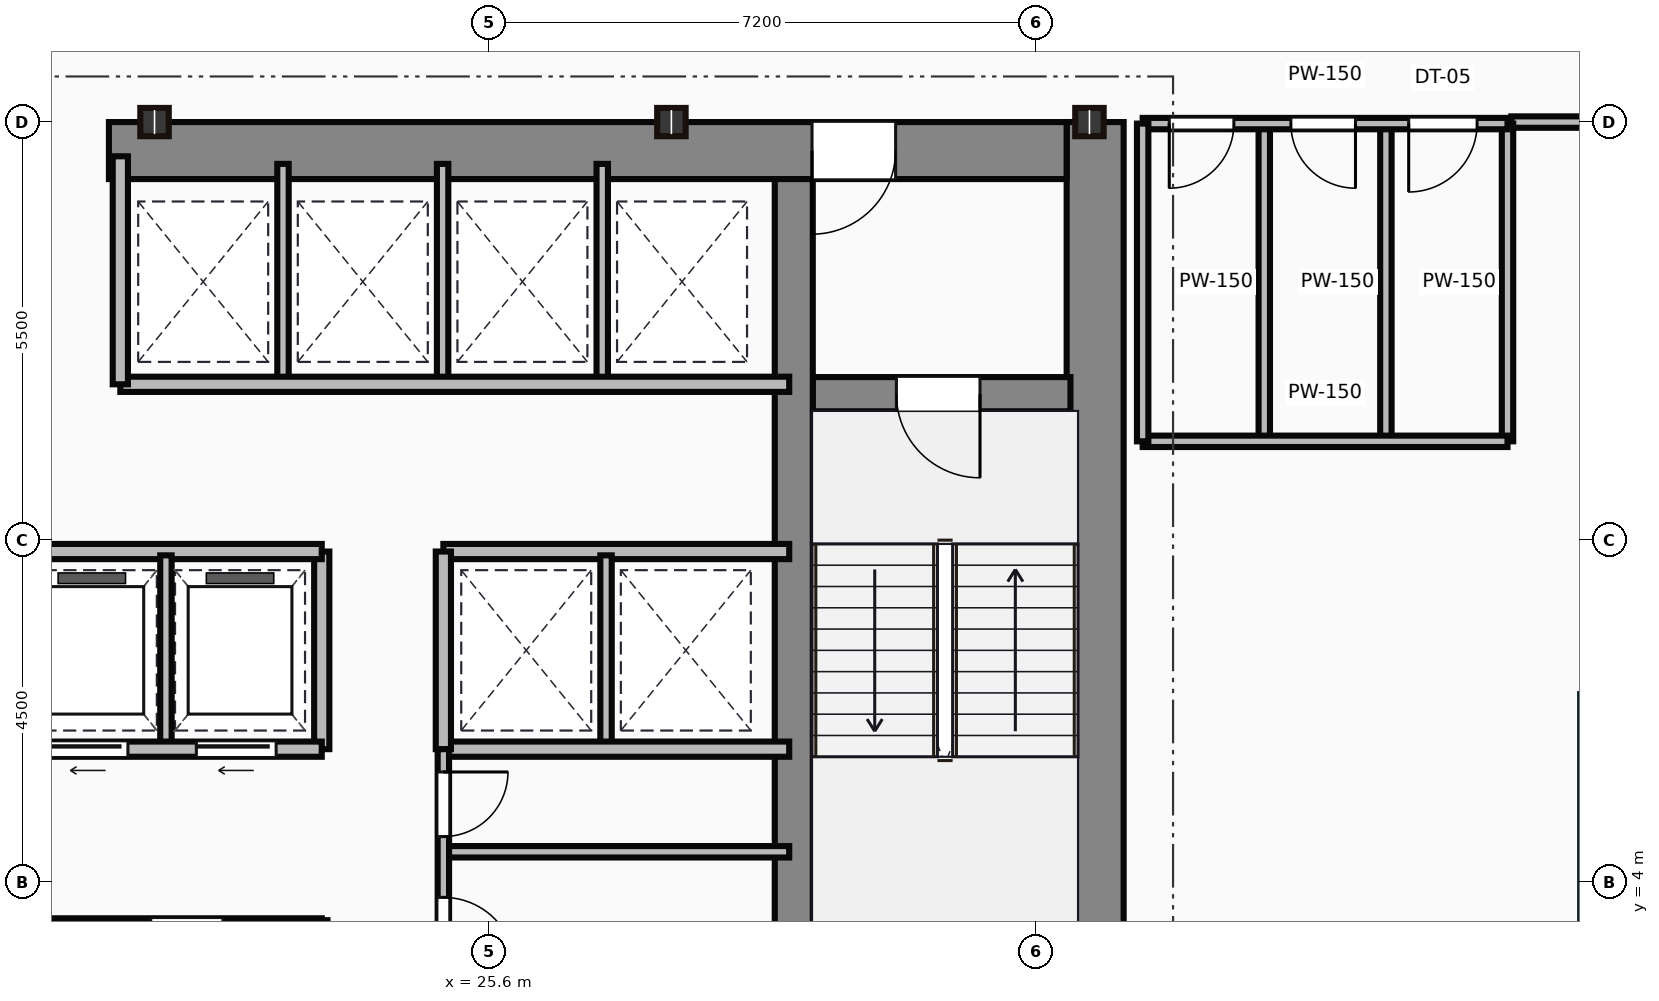
"""IFC4 building model, lengths in metres.
Left out: names, types, materials, properties, quantities, classifications, styles, units other than length and angle.
Written with IfcOpenShell. Run it as: python <this file> out.ifc"""

import sys

from ifc_helpers import new_model, si_unit, direction, frame, frame_2d, origin, origin_2d, place, context, subcontext, project, spatial, rectangle, i_section, extrude, source, transform, mapped, element, fill, save


model = new_model("IFC4")
c1 = context("Model", 3, precision=1e-05, world=origin(), true_north=direction((0.0, 1.0)))
c2 = subcontext(c1, "Body", "Model", "MODEL_VIEW")
j1 = project(units=[si_unit("LENGTHUNIT", "METRE"), si_unit("PLANEANGLEUNIT", "RADIAN")], contexts=[c1])
p1 = place(None, origin())
s1 = spatial("IfcSite", under=j1, at=p1, CompositionType="ELEMENT")
p2 = place(p1, origin())
s2 = spatial("IfcBuilding", under=s1, at=p2, CompositionType="ELEMENT")
p3 = place(p2, frame((0.0, 0.0, 169.8)))
s3 = spatial("IfcBuildingStorey", under=s2, at=p3, CompositionType="ELEMENT", Elevation=169.8)
m1 = source(origin(), c2, "Body", "SweptSolid", [
    extrude(rectangle(XDim=13.1, YDim=0.75, at=frame_2d((6.55, 0.0))), origin(), (0.0, 0.0, 1.0), 3.65),
])
p4 = place(p3, frame((33.575, 0.9, 0.0), z_axis=(0.0, 0.0, 1.0), x_axis=(0.0, 1.0, 0.0)))
e1 = element("IfcWall", 1, at=p4, inside=s3, PredefinedType="SHEAR", context=c2, shape_type="MappedRepresentation", body=[
    mapped(m1, transform((0.0, 0.0, 0.0))),
])
m2 = source(origin(), c2, "Body", "SweptSolid", [
    extrude(rectangle(XDim=12.6, YDim=0.75, at=frame_2d((6.3, 0.0))), origin(), (0.0, 0.0, 1.0), 3.65),
])
p5 = place(p3, frame((20.6, 13.625, 0.0), z_axis=(0.0, 0.0, 1.0), x_axis=(1.0, 0.0, 0.0)))
e2 = element("IfcWall", 2, at=p5, inside=s3, PredefinedType="SHEAR", context=c2, shape_type="MappedRepresentation", body=[
    mapped(m2, transform((0.0, 0.0, 0.0))),
])
p6 = place(p5, frame((9.25, 0.0, 0.0)))
e3 = element("IfcOpeningElement", 3, at=p6, cuts=e2, PredefinedType="OPENING", context=c2, shape_type="SweptSolid", body=[
    extrude(rectangle(XDim=1.1, YDim=2.15, at=frame_2d((0.55, 1.075))), frame((0.0, 0.385, 0.0), z_axis=(0.0, -1.0, 0.0), x_axis=(1.0, 0.0, 0.0)), (0.0, 0.0, 1.0), 0.77),
])
m3 = source(origin(), c2, "Body", "SweptSolid", [
    extrude(rectangle(XDim=12.35, YDim=0.5, at=frame_2d((6.175, 0.0))), origin(), (0.0, 0.0, 1.0), 3.65),
])
p7 = place(p3, frame((29.61, 0.9, 0.0), z_axis=(0.0, 0.0, 1.0), x_axis=(0.0, 1.0, 0.0)))
e4 = element("IfcWall", 4, at=p7, inside=s3, PredefinedType="SHEAR", context=c2, shape_type="MappedRepresentation", body=[
    mapped(m3, transform((0.0, 0.0, 0.0))),
])
m4 = source(origin(), c2, "Body", "SweptSolid", [
    extrude(rectangle(XDim=3.39, YDim=0.45, at=frame_2d((1.695, 0.0))), origin(), (0.0, 0.0, 1.0), 3.65),
])
p8 = place(p3, frame((29.86, 10.42, 0.0), z_axis=(0.0, 0.0, 1.0), x_axis=(1.0, 0.0, 0.0)))
e5 = element("IfcWall", 5, at=p8, inside=s3, PredefinedType="SHEAR", context=c2, shape_type="MappedRepresentation", body=[
    mapped(m4, transform((0.0, 0.0, 0.0))),
])
p9 = place(p8, frame((1.1, 0.0, 0.0)))
e6 = element("IfcOpeningElement", 6, at=p9, cuts=e5, PredefinedType="OPENING", context=c2, shape_type="SweptSolid", body=[
    extrude(rectangle(XDim=1.1, YDim=2.15, at=frame_2d((0.55, 1.075))), frame((0.0, 0.235, 0.0), z_axis=(0.0, -1.0, 0.0), x_axis=(1.0, 0.0, 0.0)), (0.0, 0.0, 1.0), 0.47),
])
m5 = source(origin(), c2, "Body", "SweptSolid", [
    extrude(i_section(OverallWidth=0.374, OverallDepth=0.372, WebThickness=0.016, FlangeThickness=0.026, at=origin_2d()), origin(), (0.0, 0.0, 1.0), 3.65),
])
for number, where, z_axis, x_axis in (
    (7, (21.2, 14.0, 0.0), (0.0, 0.0, 1.0), (1.0, 0.0, 0.0)),
    (8, (28.0, 14.0, 0.0), (0.0, 0.0, 1.0), (1.0, 0.0, 0.0)),
    (9, (33.5, 14.0, 0.0), (0.0, 0.0, 1.0), (1.0, 0.0, 0.0)),
):
    element("IfcColumn", number, at=place(p3, frame(where, z_axis=z_axis, x_axis=x_axis)), inside=s3, PredefinedType="COLUMN", context=c2, shape_type="MappedRepresentation", body=[
        mapped(m5, transform((0.0, 0.0, 0.0))),
    ])
m6 = source(origin(), c2, "Body", "SweptSolid", [
    extrude(rectangle(XDim=10.35, YDim=0.15, at=frame_2d((5.175, 0.0))), origin(), (0.0, 0.0, 1.0), 3.4),
])
p10 = place(p3, frame((13.05, 3.45, 0.0), z_axis=(0.0, 0.0, 1.0), x_axis=(1.0, 0.0, 0.0)))
e10 = element("IfcWall", 10, at=p10, inside=s3, PredefinedType="PARTITIONING", context=c2, shape_type="MappedRepresentation", body=[
    mapped(m6, transform((0.0, 0.0, 0.0))),
])
p11 = place(p10, frame((3.8, 0.0, 0.0)))
e11 = element("IfcOpeningElement", 11, at=p11, cuts=e10, PredefinedType="OPENING", context=c2, shape_type="SweptSolid", body=[
    extrude(rectangle(XDim=0.95, YDim=2.15, at=frame_2d((0.475, 1.075))), frame((0.0, 0.085, 0.0), z_axis=(0.0, -1.0, 0.0), x_axis=(1.0, 0.0, 0.0)), (0.0, 0.0, 1.0), 0.17),
])
p12 = place(p10, frame((8.1, 0.0, 0.0)))
e12 = element("IfcOpeningElement", 12, at=p12, cuts=e10, PredefinedType="OPENING", context=c2, shape_type="SweptSolid", body=[
    extrude(rectangle(XDim=0.95, YDim=2.15, at=frame_2d((0.475, 1.075))), frame((0.0, 0.085, 0.0), z_axis=(0.0, -1.0, 0.0), x_axis=(1.0, 0.0, 0.0)), (0.0, 0.0, 1.0), 0.17),
])
m7 = source(origin(), c2, "Body", "SweptSolid", [
    extrude(rectangle(XDim=2.65, YDim=0.15, at=frame_2d((1.325, 0.0))), origin(), (0.0, 0.0, 1.0), 3.4),
])
p13 = place(p3, frame((23.4, 0.85, 0.0), z_axis=(0.0, 0.0, 1.0), x_axis=(0.0, 1.0, 0.0)))
e13 = element("IfcWall", 13, at=p13, inside=s3, PredefinedType="PARTITIONING", context=c2, shape_type="MappedRepresentation", body=[
    mapped(m7, transform((0.0, 0.0, 0.0))),
])
m8 = source(origin(), c2, "Body", "SweptSolid", [
    extrude(rectangle(XDim=11.85, YDim=0.2, at=frame_2d((5.925, 0.0))), origin(), (0.0, 0.0, 1.0), 3.4),
])
p14 = place(p3, frame((11.55, 5.75, 0.0), z_axis=(0.0, 0.0, 1.0), x_axis=(1.0, 0.0, 0.0)))
e14 = element("IfcWall", 14, at=p14, inside=s3, PredefinedType="PARTITIONING", context=c2, shape_type="MappedRepresentation", body=[
    mapped(m8, transform((0.0, 0.0, 0.0))),
])
p15 = place(p14, frame((0.45, 0.0, 0.0)))
e15 = element("IfcOpeningElement", 15, at=p15, cuts=e14, PredefinedType="OPENING", context=c2, shape_type="SweptSolid", body=[
    extrude(rectangle(XDim=1.05, YDim=2.15, at=frame_2d((0.525, 1.075))), frame((0.0, 0.11, 0.0), z_axis=(0.0, -1.0, 0.0), x_axis=(1.0, 0.0, 0.0)), (0.0, 0.0, 1.0), 0.22),
])
p16 = place(p14, frame((2.4, 0.0, 0.0)))
e16 = element("IfcOpeningElement", 16, at=p16, cuts=e14, PredefinedType="OPENING", context=c2, shape_type="SweptSolid", body=[
    extrude(rectangle(XDim=1.05, YDim=2.15, at=frame_2d((0.525, 1.075))), frame((0.0, 0.11, 0.0), z_axis=(0.0, -1.0, 0.0), x_axis=(1.0, 0.0, 0.0)), (0.0, 0.0, 1.0), 0.22),
])
p17 = place(p14, frame((4.35, 0.0, 0.0)))
e17 = element("IfcOpeningElement", 17, at=p17, cuts=e14, PredefinedType="OPENING", context=c2, shape_type="SweptSolid", body=[
    extrude(rectangle(XDim=1.05, YDim=2.15, at=frame_2d((0.525, 1.075))), frame((0.0, 0.11, 0.0), z_axis=(0.0, -1.0, 0.0), x_axis=(1.0, 0.0, 0.0)), (0.0, 0.0, 1.0), 0.22),
])
p18 = place(p14, frame((6.3, 0.0, 0.0)))
e18 = element("IfcOpeningElement", 18, at=p18, cuts=e14, PredefinedType="OPENING", context=c2, shape_type="SweptSolid", body=[
    extrude(rectangle(XDim=1.05, YDim=2.15, at=frame_2d((0.525, 1.075))), frame((0.0, 0.11, 0.0), z_axis=(0.0, -1.0, 0.0), x_axis=(1.0, 0.0, 0.0)), (0.0, 0.0, 1.0), 0.22),
])
p19 = place(p14, frame((8.25, 0.0, 0.0)))
e19 = element("IfcOpeningElement", 19, at=p19, cuts=e14, PredefinedType="OPENING", context=c2, shape_type="SweptSolid", body=[
    extrude(rectangle(XDim=1.05, YDim=2.15, at=frame_2d((0.525, 1.075))), frame((0.0, 0.11, 0.0), z_axis=(0.0, -1.0, 0.0), x_axis=(1.0, 0.0, 0.0)), (0.0, 0.0, 1.0), 0.22),
])
p20 = place(p14, frame((10.2, 0.0, 0.0)))
e20 = element("IfcOpeningElement", 20, at=p20, cuts=e14, PredefinedType="OPENING", context=c2, shape_type="SweptSolid", body=[
    extrude(rectangle(XDim=1.05, YDim=2.15, at=frame_2d((0.525, 1.075))), frame((0.0, 0.11, 0.0), z_axis=(0.0, -1.0, 0.0), x_axis=(1.0, 0.0, 0.0)), (0.0, 0.0, 1.0), 0.22),
])
p21 = place(p3, frame((11.55, 8.35, 0.0), z_axis=(0.0, 0.0, 1.0), x_axis=(1.0, 0.0, 0.0)))
e21 = element("IfcWall", 21, at=p21, inside=s3, PredefinedType="PARTITIONING", context=c2, shape_type="MappedRepresentation", body=[
    mapped(m8, transform((0.0, 0.0, 0.0))),
])
m9 = source(origin(), c2, "Body", "SweptSolid", [
    extrude(rectangle(XDim=2.6, YDim=0.2, at=frame_2d((1.3, 0.0))), origin(), (0.0, 0.0, 1.0), 3.4),
])
p22 = place(p3, frame((23.4, 5.75, 0.0), z_axis=(0.0, 0.0, 1.0), x_axis=(0.0, 1.0, 0.0)))
e22 = element("IfcWall", 22, at=p22, inside=s3, PredefinedType="PARTITIONING", context=c2, shape_type="MappedRepresentation", body=[
    mapped(m9, transform((0.0, 0.0, 0.0))),
])
m10 = source(origin(), c2, "Body", "SweptSolid", [
    extrude(rectangle(XDim=2.5, YDim=0.15, at=frame_2d((1.25, 0.0))), origin(), (0.0, 0.0, 1.0), 3.4),
])
p23 = place(p3, frame((21.35, 5.8, 0.0), z_axis=(0.0, 0.0, 1.0), x_axis=(0.0, 1.0, 0.0)))
e23 = element("IfcWall", 23, at=p23, inside=s3, PredefinedType="PARTITIONING", context=c2, shape_type="MappedRepresentation", body=[
    mapped(m10, transform((0.0, 0.0, 0.0))),
])
m11 = source(origin(), c2, "Body", "SweptSolid", [
    extrude(rectangle(XDim=8.8, YDim=0.2, at=frame_2d((4.4, 0.0))), origin(), (0.0, 0.0, 1.0), 3.4),
])
p24 = place(p3, frame((20.75, 10.55, 0.0), z_axis=(0.0, 0.0, 1.0), x_axis=(1.0, 0.0, 0.0)))
e24 = element("IfcWall", 24, at=p24, inside=s3, PredefinedType="PARTITIONING", context=c2, shape_type="MappedRepresentation", body=[
    mapped(m11, transform((0.0, 0.0, 0.0))),
])
m12 = source(origin(), c2, "Body", "SweptSolid", [
    extrude(rectangle(XDim=3.0, YDim=0.2, at=frame_2d((1.5, 0.0))), origin(), (0.0, 0.0, 1.0), 3.4),
])
p25 = place(p3, frame((20.75, 10.55, 0.0), z_axis=(0.0, 0.0, 1.0), x_axis=(0.0, 1.0, 0.0)))
e25 = element("IfcWall", 25, at=p25, inside=s3, PredefinedType="PARTITIONING", context=c2, shape_type="MappedRepresentation", body=[
    mapped(m12, transform((0.0, 0.0, 0.0))),
])
m13 = source(origin(), c2, "Body", "SweptSolid", [
    extrude(rectangle(XDim=2.85, YDim=0.15, at=frame_2d((1.425, 0.0))), origin(), (0.0, 0.0, 1.0), 3.4),
])
for number, where, z_axis, x_axis in (
    (26, (22.89, 10.6, 0.0), (0.0, 0.0, 1.0), (0.0, 1.0, 0.0)),
    (27, (24.99, 10.6, 0.0), (0.0, 0.0, 1.0), (0.0, 1.0, 0.0)),
    (28, (27.09, 10.6, 0.0), (0.0, 0.0, 1.0), (0.0, 1.0, 0.0)),
):
    element("IfcWall", number, at=place(p3, frame(where, z_axis=z_axis, x_axis=x_axis)), inside=s3, PredefinedType="PARTITIONING", context=c2, shape_type="MappedRepresentation", body=[
        mapped(m13, transform((0.0, 0.0, 0.0))),
    ])
m14 = source(origin(), c2, "Body", "SweptSolid", [
    extrude(rectangle(XDim=4.55, YDim=0.2, at=frame_2d((2.275, 0.0))), origin(), (0.0, 0.0, 1.0), 3.4),
])
for number, where, z_axis, x_axis in (
    (29, (25.0, 8.35, 0.0), (0.0, 0.0, 1.0), (1.0, 0.0, 0.0)),
    (30, (25.0, 5.75, 0.0), (0.0, 0.0, 1.0), (1.0, 0.0, 0.0)),
):
    element("IfcWall", number, at=place(p3, frame(where, z_axis=z_axis, x_axis=x_axis)), inside=s3, PredefinedType="PARTITIONING", context=c2, shape_type="MappedRepresentation", body=[
        mapped(m14, transform((0.0, 0.0, 0.0))),
    ])
p26 = place(p3, frame((25.0, 5.75, 0.0), z_axis=(0.0, 0.0, 1.0), x_axis=(0.0, 1.0, 0.0)))
e31 = element("IfcWall", 31, at=p26, inside=s3, PredefinedType="PARTITIONING", context=c2, shape_type="MappedRepresentation", body=[
    mapped(m9, transform((0.0, 0.0, 0.0))),
])
p27 = place(p3, frame((27.14, 5.8, 0.0), z_axis=(0.0, 0.0, 1.0), x_axis=(0.0, 1.0, 0.0)))
e32 = element("IfcWall", 32, at=p27, inside=s3, PredefinedType="PARTITIONING", context=c2, shape_type="MappedRepresentation", body=[
    mapped(m10, transform((0.0, 0.0, 0.0))),
])
m15 = source(origin(), c2, "Body", "SweptSolid", [
    extrude(rectangle(XDim=4.9, YDim=0.15, at=frame_2d((2.45, 0.0))), origin(), (0.0, 0.0, 1.0), 3.4),
])
p28 = place(p3, frame((25.0, 0.85, 0.0), z_axis=(0.0, 0.0, 1.0), x_axis=(0.0, 1.0, 0.0)))
e33 = element("IfcWall", 33, at=p28, inside=s3, PredefinedType="PARTITIONING", context=c2, shape_type="MappedRepresentation", body=[
    mapped(m15, transform((0.0, 0.0, 0.0))),
])
p29 = place(p28, frame((2.0, 0.0, 0.0)))
e34 = element("IfcOpeningElement", 34, at=p29, cuts=e33, PredefinedType="OPENING", context=c2, shape_type="SweptSolid", body=[
    extrude(rectangle(XDim=0.95, YDim=2.15, at=frame_2d((0.475, 1.075))), frame((0.0, 0.085, 0.0), z_axis=(0.0, -1.0, 0.0), x_axis=(1.0, 0.0, 0.0)), (0.0, 0.0, 1.0), 0.17),
])
p30 = place(p28, frame((3.75, 0.0, 0.0)))
e35 = element("IfcOpeningElement", 35, at=p30, cuts=e33, PredefinedType="OPENING", context=c2, shape_type="SweptSolid", body=[
    extrude(rectangle(XDim=0.85, YDim=2.15, at=frame_2d((0.425, 1.075))), frame((0.0, 0.085, 0.0), z_axis=(0.0, -1.0, 0.0), x_axis=(1.0, 0.0, 0.0)), (0.0, 0.0, 1.0), 0.17),
])
m16 = source(origin(), c2, "Body", "SweptSolid", [
    extrude(rectangle(XDim=4.55, YDim=0.15, at=frame_2d((2.275, 0.0))), origin(), (0.0, 0.0, 1.0), 3.4),
])
p31 = place(p3, frame((25.0, 4.4, 0.0), z_axis=(0.0, 0.0, 1.0), x_axis=(1.0, 0.0, 0.0)))
e36 = element("IfcWall", 36, at=p31, inside=s3, PredefinedType="PARTITIONING", context=c2, shape_type="MappedRepresentation", body=[
    mapped(m16, transform((0.0, 0.0, 0.0))),
])
m17 = source(origin(), c2, "Body", "SweptSolid", [
    extrude(rectangle(XDim=4.8, YDim=0.15, at=frame_2d((2.4, 0.0))), origin(), (0.0, 0.0, 1.0), 2.76),
])
p32 = place(p3, frame((34.2, 13.98, 0.0), z_axis=(0.0, 0.0, 1.0), x_axis=(1.0, 0.0, 0.0)))
e37 = element("IfcWall", 37, at=p32, inside=s3, PredefinedType="PARTITIONING", context=c2, shape_type="MappedRepresentation", body=[
    mapped(m17, transform((0.0, 0.0, 0.0))),
])
p33 = place(p32, frame((0.35, 0.0, 0.0)))
e38 = element("IfcOpeningElement", 38, at=p33, cuts=e37, PredefinedType="OPENING", context=c2, shape_type="SweptSolid", body=[
    extrude(rectangle(XDim=0.85, YDim=2.1, at=frame_2d((0.425, 1.05))), frame((0.0, 0.085, 0.0), z_axis=(0.0, -1.0, 0.0), x_axis=(1.0, 0.0, 0.0)), (0.0, 0.0, 1.0), 0.17),
])
p34 = place(p32, frame((1.95, 0.0, 0.0)))
e39 = element("IfcOpeningElement", 39, at=p34, cuts=e37, PredefinedType="OPENING", context=c2, shape_type="SweptSolid", body=[
    extrude(rectangle(XDim=0.85, YDim=2.1, at=frame_2d((0.425, 1.05))), frame((0.0, 0.085, 0.0), z_axis=(0.0, -1.0, 0.0), x_axis=(1.0, 0.0, 0.0)), (0.0, 0.0, 1.0), 0.17),
])
p35 = place(p32, frame((3.5, 0.0, 0.0)))
e40 = element("IfcOpeningElement", 40, at=p35, cuts=e37, PredefinedType="OPENING", context=c2, shape_type="SweptSolid", body=[
    extrude(rectangle(XDim=0.9, YDim=2.1, at=frame_2d((0.45, 1.05))), frame((0.0, 0.085, 0.0), z_axis=(0.0, -1.0, 0.0), x_axis=(1.0, 0.0, 0.0)), (0.0, 0.0, 1.0), 0.17),
])
m18 = source(origin(), c2, "Body", "SweptSolid", [
    extrude(rectangle(XDim=4.8, YDim=0.15, at=frame_2d((2.4, 0.0))), origin(), (0.0, 0.0, 1.0), 3.4),
])
p36 = place(p3, frame((34.2, 9.8, 0.0), z_axis=(0.0, 0.0, 1.0), x_axis=(1.0, 0.0, 0.0)))
e41 = element("IfcWall", 41, at=p36, inside=s3, PredefinedType="PARTITIONING", context=c2, shape_type="MappedRepresentation", body=[
    mapped(m18, transform((0.0, 0.0, 0.0))),
])
m19 = source(origin(), c2, "Body", "SweptSolid", [
    extrude(rectangle(XDim=4.18, YDim=0.15, at=frame_2d((2.09, 0.0))), origin(), (0.0, 0.0, 1.0), 3.4),
])
for number, where, z_axis, x_axis in (
    (42, (39.0, 9.8, 0.0), (0.0, 0.0, 1.0), (0.0, 1.0, 0.0)),
    (43, (34.2, 9.8, 0.0), (0.0, 0.0, 1.0), (0.0, 1.0, 0.0)),
    (44, (35.8, 9.8, 0.0), (0.0, 0.0, 1.0), (0.0, 1.0, 0.0)),
    (45, (37.4, 9.8, 0.0), (0.0, 0.0, 1.0), (0.0, 1.0, 0.0)),
):
    element("IfcWall", number, at=place(p3, frame(where, z_axis=z_axis, x_axis=x_axis)), inside=s3, PredefinedType="PARTITIONING", context=c2, shape_type="MappedRepresentation", body=[
        mapped(m19, transform((0.0, 0.0, 0.0))),
    ])
m20 = source(origin(), c2, "Body", "SweptSolid", [
    extrude(rectangle(XDim=1.75, YDim=0.15, at=frame_2d((0.875, 0.0))), origin(), (0.0, 0.0, 1.0), 2.76),
])
p37 = place(p3, frame((40.8, 14.0, 0.0), z_axis=(0.0, 0.0, 1.0), x_axis=(-1.0, 0.0, 0.0)))
e46 = element("IfcWall", 46, at=p37, inside=s3, PredefinedType="PARTITIONING", context=c2, shape_type="MappedRepresentation", body=[
    mapped(m20, transform((0.0, 0.0, 0.0))),
])
m21 = source(origin(), c2, "Body", "SweptSolid", [
    extrude(rectangle(XDim=1.1, YDim=2.15, at=frame_2d((0.55, 1.075))), frame((0.0, 0.025, 0.0), z_axis=(0.0, -1.0, 0.0), x_axis=(1.0, 0.0, 0.0)), (0.0, 0.0, 1.0), 0.05),
])
p38 = place(p9, frame((1.1, 0.0, 0.0), z_axis=(0.0, 0.0, 1.0), x_axis=(-1.0, 0.0, 0.0)))
e47 = element("IfcDoor", 47, at=p38, inside=s3, OperationType="SINGLE_SWING_RIGHT", PredefinedType="DOOR", context=c2, shape_type="MappedRepresentation", body=[
    mapped(m21, transform((0.0, 0.0, 0.0))),
])
fill(e6, e47)
p39 = place(p6, origin())
e48 = element("IfcDoor", 48, at=p39, inside=s3, OperationType="SINGLE_SWING_LEFT", PredefinedType="DOOR", context=c2, shape_type="MappedRepresentation", body=[
    mapped(m21, transform((0.0, 0.0, 0.0))),
])
fill(e3, e48)
m22 = source(origin(), c2, "Body", "SweptSolid", [
    extrude(rectangle(XDim=1.05, YDim=2.15, at=frame_2d((0.525, 1.075))), frame((0.0, 0.025, 0.0), z_axis=(0.0, -1.0, 0.0), x_axis=(1.0, 0.0, 0.0)), (0.0, 0.0, 1.0), 0.05),
])
p40 = place(p19, frame((1.05, 0.0, 0.0), z_axis=(0.0, 0.0, 1.0), x_axis=(-1.0, 0.0, 0.0)))
e49 = element("IfcDoor", 49, at=p40, inside=s3, OperationType="SLIDING_TO_LEFT", PredefinedType="DOOR", context=c2, shape_type="MappedRepresentation", body=[
    mapped(m22, transform((0.0, 0.0, 0.0))),
])
fill(e19, e49)
p41 = place(p20, frame((1.05, 0.0, 0.0), z_axis=(0.0, 0.0, 1.0), x_axis=(-1.0, 0.0, 0.0)))
e50 = element("IfcDoor", 50, at=p41, inside=s3, OperationType="SLIDING_TO_LEFT", PredefinedType="DOOR", context=c2, shape_type="MappedRepresentation", body=[
    mapped(m22, transform((0.0, 0.0, 0.0))),
])
fill(e20, e50)
m23 = source(origin(), c2, "Body", "SweptSolid", [
    extrude(rectangle(XDim=0.95, YDim=2.15, at=frame_2d((0.475, 1.075))), frame((0.0, 0.025, 0.0), z_axis=(0.0, -1.0, 0.0), x_axis=(1.0, 0.0, 0.0)), (0.0, 0.0, 1.0), 0.05),
])
p42 = place(p29, origin())
e51 = element("IfcDoor", 51, at=p42, inside=s3, OperationType="SINGLE_SWING_LEFT", PredefinedType="DOOR", context=c2, shape_type="MappedRepresentation", body=[
    mapped(m23, transform((0.0, 0.0, 0.0))),
])
fill(e34, e51)
m24 = source(origin(), c2, "Body", "SweptSolid", [
    extrude(rectangle(XDim=0.85, YDim=2.15, at=frame_2d((0.425, 1.075))), frame((0.0, 0.025, 0.0), z_axis=(0.0, -1.0, 0.0), x_axis=(1.0, 0.0, 0.0)), (0.0, 0.0, 1.0), 0.05),
])
p43 = place(p30, origin())
e52 = element("IfcDoor", 52, at=p43, inside=s3, OperationType="SINGLE_SWING_RIGHT", PredefinedType="DOOR", context=c2, shape_type="MappedRepresentation", body=[
    mapped(m24, transform((0.0, 0.0, 0.0))),
])
fill(e35, e52)
m25 = source(origin(), c2, "Body", "SweptSolid", [
    extrude(rectangle(XDim=0.85, YDim=2.1, at=frame_2d((0.425, 1.05))), frame((0.0, 0.025, 0.0), z_axis=(0.0, -1.0, 0.0), x_axis=(1.0, 0.0, 0.0)), (0.0, 0.0, 1.0), 0.05),
])
p44 = place(p33, frame((0.85, 0.0, 0.0), z_axis=(0.0, 0.0, 1.0), x_axis=(-1.0, 0.0, 0.0)))
e53 = element("IfcDoor", 53, at=p44, inside=s3, OperationType="SINGLE_SWING_LEFT", PredefinedType="DOOR", context=c2, shape_type="MappedRepresentation", body=[
    mapped(m25, transform((0.0, 0.0, 0.0))),
])
fill(e38, e53)
p45 = place(p34, frame((0.85, 0.0, 0.0), z_axis=(0.0, 0.0, 1.0), x_axis=(-1.0, 0.0, 0.0)))
e54 = element("IfcDoor", 54, at=p45, inside=s3, OperationType="SINGLE_SWING_RIGHT", PredefinedType="DOOR", context=c2, shape_type="MappedRepresentation", body=[
    mapped(m25, transform((0.0, 0.0, 0.0))),
])
fill(e39, e54)
m26 = source(origin(), c2, "Body", "SweptSolid", [
    extrude(rectangle(XDim=0.9, YDim=2.1, at=frame_2d((0.45, 1.05))), frame((0.0, 0.025, 0.0), z_axis=(0.0, -1.0, 0.0), x_axis=(1.0, 0.0, 0.0)), (0.0, 0.0, 1.0), 0.05),
])
p46 = place(p35, frame((0.9, 0.0, 0.0), z_axis=(0.0, 0.0, 1.0), x_axis=(-1.0, 0.0, 0.0)))
e55 = element("IfcDoor", 55, at=p46, inside=s3, OperationType="SINGLE_SWING_LEFT", PredefinedType="DOOR", context=c2, shape_type="MappedRepresentation", body=[
    mapped(m26, transform((0.0, 0.0, 0.0))),
])
fill(e40, e55)
save(model, sys.argv[1])
